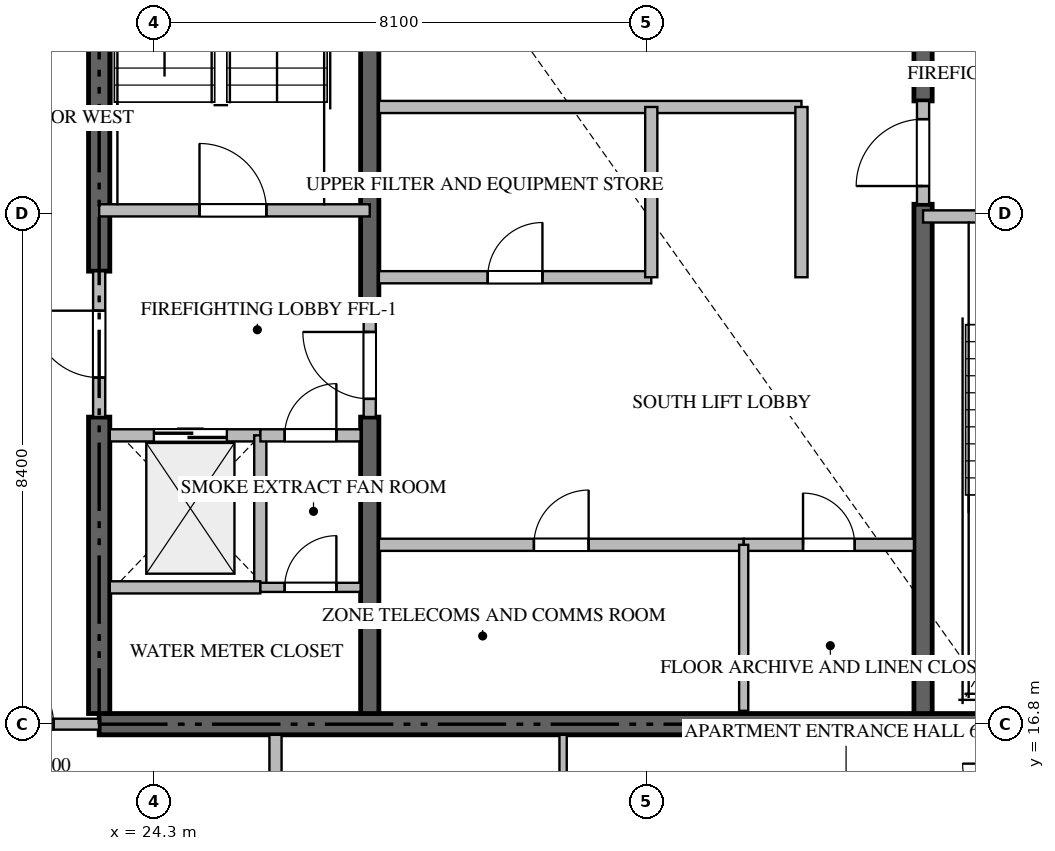
"""IFC4 building model, lengths in metres.
Left out: names, types, materials, properties, quantities, classifications, styles, units other than length and angle.
Written with IfcOpenShell. Run it as: python <this file> out.ifc"""

import sys

from ifc_helpers import new_model, si_unit, direction, frame, frame_2d, origin, place, context, subcontext, project, spatial, rectangle, extrude, source, transform, mapped, element, fill, save


model = new_model("IFC4")
c1 = context("Model", 3, precision=1e-05, world=origin(), true_north=direction((0.0, 1.0)))
c2 = subcontext(c1, "Body", "Model", "MODEL_VIEW")
j1 = project(units=[si_unit("LENGTHUNIT", "METRE"), si_unit("PLANEANGLEUNIT", "RADIAN")], contexts=[c1])
p1 = place(None, origin())
s1 = spatial("IfcSite", under=j1, at=p1, CompositionType="ELEMENT")
p2 = place(p1, origin())
s2 = spatial("IfcBuilding", under=s1, at=p2, CompositionType="ELEMENT")
p3 = place(p2, frame((0.0, 0.0, 252.8)))
s3 = spatial("IfcBuildingStorey", under=s2, at=p3, CompositionType="ELEMENT", Elevation=252.8)
p4 = place(p3, frame((23.4, 16.8, -0.26), z_axis=(0.0, 0.0, 1.0), x_axis=(1.0, 0.0, 0.0)))
e1 = element("IfcWall", 1, at=p4, inside=s3, PredefinedType="SHEAR", context=c2, shape_type="SweptSolid", body=[
    extrude(rectangle(XDim=18.0, YDim=0.35, at=frame_2d((9.0, 0.0))), origin(), (0.0, 0.0, 1.0), 3.848),
])
p5 = place(p3, frame((23.4, 16.975, -0.26), z_axis=(0.0, 0.0, 1.0), x_axis=(0.0, 1.0, 0.0)))
e2 = element("IfcWall", 2, at=p5, inside=s3, PredefinedType="SHEAR", context=c2, shape_type="SweptSolid", body=[
    extrude(rectangle(XDim=4.875, YDim=0.35, at=frame_2d((2.438, 0.0))), origin(), (0.0, 0.0, 1.0), 3.848),
])
p6 = place(p3, frame((23.4, 24.25, -0.26), z_axis=(0.0, 0.0, 1.0), x_axis=(0.0, 1.0, 0.0)))
e3 = element("IfcWall", 3, at=p6, inside=s3, PredefinedType="SHEAR", context=c2, shape_type="SweptSolid", body=[
    extrude(rectangle(XDim=9.175, YDim=0.35, at=frame_2d((4.587, 0.0))), origin(), (0.0, 0.0, 1.0), 3.848),
])
p7 = place(p3, frame((27.85, 16.975, -0.26), z_axis=(0.0, 0.0, 1.0), x_axis=(0.0, 1.0, 0.0)))
e4 = element("IfcWall", 4, at=p7, inside=s3, PredefinedType="SHEAR", context=c2, shape_type="SweptSolid", body=[
    extrude(rectangle(XDim=4.875, YDim=0.3, at=frame_2d((2.438, 0.0))), origin(), (0.0, 0.0, 1.0), 3.848),
])
p8 = place(p3, frame((27.85, 23.55, -0.26), z_axis=(0.0, 0.0, 1.0), x_axis=(0.0, 1.0, 0.0)))
e5 = element("IfcWall", 5, at=p8, inside=s3, PredefinedType="SHEAR", context=c2, shape_type="SweptSolid", body=[
    extrude(rectangle(XDim=9.875, YDim=0.3, at=frame_2d((4.938, 0.0))), origin(), (0.0, 0.0, 1.0), 3.848),
])
p9 = place(p3, frame((36.95, 16.975, -0.26), z_axis=(0.0, 0.0, 1.0), x_axis=(0.0, 1.0, 0.0)))
e6 = element("IfcWall", 6, at=p9, inside=s3, PredefinedType="SHEAR", context=c2, shape_type="SweptSolid", body=[
    extrude(rectangle(XDim=8.375, YDim=0.3, at=frame_2d((4.188, 0.0))), origin(), (0.0, 0.0, 1.0), 3.848),
])
p10 = place(p3, frame((36.95, 27.05, -0.26), z_axis=(0.0, 0.0, 1.0), x_axis=(0.0, 1.0, 0.0)))
e7 = element("IfcWall", 7, at=p10, inside=s3, PredefinedType="SHEAR", context=c2, shape_type="SweptSolid", body=[
    extrude(rectangle(XDim=6.375, YDim=0.3, at=frame_2d((3.188, 0.0))), origin(), (0.0, 0.0, 1.0), 3.848),
])
p11 = place(p3, frame((23.4, 25.25, 0.0), z_axis=(0.0, 0.0, 1.0), x_axis=(1.0, 0.0, 0.0)))
e8 = element("IfcWall", 8, at=p11, inside=s3, PredefinedType="STANDARD", context=c2, shape_type="SweptSolid", body=[
    extrude(rectangle(XDim=4.45, YDim=0.2, at=frame_2d((2.225, 0.0))), origin(), (0.0, 0.0, 1.0), 3.59),
])
p12 = place(p11, frame((1.65, 0.0, 0.0)))
e9 = element("IfcOpeningElement", 9, at=p12, cuts=e8, PredefinedType="OPENING", context=c2, shape_type="SweptSolid", body=[
    extrude(rectangle(XDim=1.1, YDim=2.15, at=frame_2d((0.55, 1.075))), frame((0.0, 0.11, 0.0), z_axis=(0.0, -1.0, 0.0), x_axis=(1.0, 0.0, 0.0)), (0.0, 0.0, 1.0), 0.22),
])
p13 = place(p3, frame((36.95, 25.15, 0.0), z_axis=(0.0, 0.0, 1.0), x_axis=(1.0, 0.0, 0.0)))
e10 = element("IfcWall", 10, at=p13, inside=s3, PredefinedType="STANDARD", context=c2, shape_type="SweptSolid", body=[
    extrude(rectangle(XDim=4.45, YDim=0.2, at=frame_2d((2.225, 0.0))), origin(), (0.0, 0.0, 1.0), 3.59),
])
p14 = place(p13, frame((1.65, 0.0, 0.0)))
e11 = element("IfcOpeningElement", 11, at=p14, cuts=e10, PredefinedType="OPENING", context=c2, shape_type="SweptSolid", body=[
    extrude(rectangle(XDim=1.1, YDim=2.15, at=frame_2d((0.55, 1.075))), frame((0.0, 0.11, 0.0), z_axis=(0.0, -1.0, 0.0), x_axis=(1.0, 0.0, 0.0)), (0.0, 0.0, 1.0), 0.22),
])
p15 = place(p3, frame((23.575, 21.55, 0.0), z_axis=(0.0, 0.0, 1.0), x_axis=(1.0, 0.0, 0.0)))
e12 = element("IfcWall", 12, at=p15, inside=s3, PredefinedType="STANDARD", context=c2, shape_type="SweptSolid", body=[
    extrude(rectangle(XDim=2.475, YDim=0.2, at=frame_2d((1.238, 0.0))), origin(), (0.0, 0.0, 1.0), 3.59),
])
p16 = place(p15, frame((0.725, 0.0, 0.0)))
e13 = element("IfcOpeningElement", 13, at=p16, cuts=e12, PredefinedType="OPENING", context=c2, shape_type="SweptSolid", body=[
    extrude(rectangle(XDim=1.2, YDim=2.2, at=frame_2d((0.6, 1.1))), frame((0.0, 0.11, 0.0), z_axis=(0.0, -1.0, 0.0), x_axis=(1.0, 0.0, 0.0)), (0.0, 0.0, 1.0), 0.22),
])
p17 = place(p3, frame((26.05, 19.05, 0.0), z_axis=(0.0, 0.0, 1.0), x_axis=(0.0, 1.0, 0.0)))
e14 = element("IfcWall", 14, at=p17, inside=s3, PredefinedType="STANDARD", context=c2, shape_type="SweptSolid", body=[
    extrude(rectangle(XDim=2.5, YDim=0.2, at=frame_2d((1.25, 0.0))), origin(), (0.0, 0.0, 1.0), 3.59),
])
p18 = place(p3, frame((23.575, 19.05, 0.0), z_axis=(0.0, 0.0, 1.0), x_axis=(1.0, 0.0, 0.0)))
e15 = element("IfcWall", 15, at=p18, inside=s3, PredefinedType="STANDARD", context=c2, shape_type="SweptSolid", body=[
    extrude(rectangle(XDim=2.475, YDim=0.2, at=frame_2d((1.238, 0.0))), origin(), (0.0, 0.0, 1.0), 3.59),
])
p19 = place(p3, frame((26.052, 21.55, 0.0), z_axis=(0.0, 0.0, 1.0), x_axis=(1.0, 0.0, 0.0)))
e16 = element("IfcWall", 16, at=p19, inside=s3, PredefinedType="STANDARD", context=c2, shape_type="SweptSolid", body=[
    extrude(rectangle(XDim=1.648, YDim=0.2, at=frame_2d((0.824, 0.0))), origin(), (0.0, 0.0, 1.0), 3.59),
])
p20 = place(p19, frame((0.399, 0.0, 0.0)))
e17 = element("IfcOpeningElement", 17, at=p20, cuts=e16, PredefinedType="OPENING", context=c2, shape_type="SweptSolid", body=[
    extrude(rectangle(XDim=0.85, YDim=2.1, at=frame_2d((0.425, 1.05))), frame((0.0, 0.11, 0.0), z_axis=(0.0, -1.0, 0.0), x_axis=(1.0, 0.0, 0.0)), (0.0, 0.0, 1.0), 0.22),
])
p21 = place(p3, frame((23.4, 21.852, 0.0), z_axis=(0.0, 0.0, 1.0), x_axis=(0.0, 1.0, 0.0)))
e18 = element("IfcWall", 18, at=p21, inside=s3, PredefinedType="STANDARD", context=c2, shape_type="SweptSolid", body=[
    extrude(rectangle(XDim=2.396, YDim=0.2, at=frame_2d((1.198, 0.0))), origin(), (0.0, 0.0, 1.0), 3.59),
])
p22 = place(p21, frame((0.648, 0.0, 0.0)))
e19 = element("IfcOpeningElement", 19, at=p22, cuts=e18, PredefinedType="OPENING", context=c2, shape_type="SweptSolid", body=[
    extrude(rectangle(XDim=1.1, YDim=2.15, at=frame_2d((0.55, 1.075))), frame((0.0, 0.11, 0.0), z_axis=(0.0, -1.0, 0.0), x_axis=(1.0, 0.0, 0.0)), (0.0, 0.0, 1.0), 0.22),
])
p23 = place(p3, frame((27.85, 21.852, 0.0), z_axis=(0.0, 0.0, 1.0), x_axis=(0.0, 1.0, 0.0)))
e20 = element("IfcWall", 20, at=p23, inside=s3, PredefinedType="STANDARD", context=c2, shape_type="SweptSolid", body=[
    extrude(rectangle(XDim=1.696, YDim=0.2, at=frame_2d((0.848, 0.0))), origin(), (0.0, 0.0, 1.0), 3.59),
])
p24 = place(p23, frame((0.298, 0.0, 0.0)))
e21 = element("IfcOpeningElement", 21, at=p24, cuts=e20, PredefinedType="OPENING", context=c2, shape_type="SweptSolid", body=[
    extrude(rectangle(XDim=1.1, YDim=2.15, at=frame_2d((0.55, 1.075))), frame((0.0, 0.11, 0.0), z_axis=(0.0, -1.0, 0.0), x_axis=(1.0, 0.0, 0.0)), (0.0, 0.0, 1.0), 0.22),
])
p25 = place(p3, frame((36.95, 25.352, 0.0), z_axis=(0.0, 0.0, 1.0), x_axis=(0.0, 1.0, 0.0)))
e22 = element("IfcWall", 22, at=p25, inside=s3, PredefinedType="STANDARD", context=c2, shape_type="SweptSolid", body=[
    extrude(rectangle(XDim=1.696, YDim=0.2, at=frame_2d((0.848, 0.0))), origin(), (0.0, 0.0, 1.0), 3.59),
])
p26 = place(p25, frame((0.298, 0.0, 0.0)))
e23 = element("IfcOpeningElement", 23, at=p26, cuts=e22, PredefinedType="OPENING", context=c2, shape_type="SweptSolid", body=[
    extrude(rectangle(XDim=1.1, YDim=2.15, at=frame_2d((0.55, 1.075))), frame((0.0, 0.11, 0.0), z_axis=(0.0, -1.0, 0.0), x_axis=(1.0, 0.0, 0.0)), (0.0, 0.0, 1.0), 0.22),
])
p27 = place(p3, frame((26.052, 19.05, 0.0), z_axis=(0.0, 0.0, 1.0), x_axis=(1.0, 0.0, 0.0)))
e24 = element("IfcWall", 24, at=p27, inside=s3, PredefinedType="PARTITIONING", context=c2, shape_type="SweptSolid", body=[
    extrude(rectangle(XDim=1.648, YDim=0.15, at=frame_2d((0.824, 0.0))), origin(), (0.0, 0.0, 1.0), 3.59),
])
p28 = place(p27, frame((0.399, 0.0, 0.0)))
e25 = element("IfcOpeningElement", 25, at=p28, cuts=e24, PredefinedType="OPENING", context=c2, shape_type="SweptSolid", body=[
    extrude(rectangle(XDim=0.85, YDim=2.1, at=frame_2d((0.425, 1.05))), frame((0.0, 0.085, 0.0), z_axis=(0.0, -1.0, 0.0), x_axis=(1.0, 0.0, 0.0)), (0.0, 0.0, 1.0), 0.17),
])
p29 = place(p3, frame((28.0, 19.75, 0.0), z_axis=(0.0, 0.0, 1.0), x_axis=(1.0, 0.0, 0.0)))
e26 = element("IfcWall", 26, at=p29, inside=s3, PredefinedType="STANDARD", context=c2, shape_type="SweptSolid", body=[
    extrude(rectangle(XDim=6.0, YDim=0.2, at=frame_2d((3.0, 0.0))), origin(), (0.0, 0.0, 1.0), 3.59),
])
p30 = place(p29, frame((2.55, 0.0, 0.0)))
e27 = element("IfcOpeningElement", 27, at=p30, cuts=e26, PredefinedType="OPENING", context=c2, shape_type="SweptSolid", body=[
    extrude(rectangle(XDim=0.9, YDim=2.1, at=frame_2d((0.45, 1.05))), frame((0.0, 0.11, 0.0), z_axis=(0.0, -1.0, 0.0), x_axis=(1.0, 0.0, 0.0)), (0.0, 0.0, 1.0), 0.22),
])
p31 = place(p3, frame((34.002, 19.75, 0.0), z_axis=(0.0, 0.0, 1.0), x_axis=(1.0, 0.0, 0.0)))
e28 = element("IfcWall", 28, at=p31, inside=s3, PredefinedType="STANDARD", context=c2, shape_type="SweptSolid", body=[
    extrude(rectangle(XDim=2.798, YDim=0.2, at=frame_2d((1.399, 0.0))), origin(), (0.0, 0.0, 1.0), 3.59),
])
p32 = place(p31, frame((0.974, 0.0, 0.0)))
e29 = element("IfcOpeningElement", 29, at=p32, cuts=e28, PredefinedType="OPENING", context=c2, shape_type="SweptSolid", body=[
    extrude(rectangle(XDim=0.85, YDim=2.1, at=frame_2d((0.425, 1.05))), frame((0.0, 0.11, 0.0), z_axis=(0.0, -1.0, 0.0), x_axis=(1.0, 0.0, 0.0)), (0.0, 0.0, 1.0), 0.22),
])
p33 = place(p3, frame((34.0, 17.02, 0.0), z_axis=(0.0, 0.0, 1.0), x_axis=(0.0, 1.0, 0.0)))
e30 = element("IfcWall", 30, at=p33, inside=s3, PredefinedType="PARTITIONING", context=c2, shape_type="SweptSolid", body=[
    extrude(rectangle(XDim=2.73, YDim=0.15, at=frame_2d((1.365, 0.0))), origin(), (0.0, 0.0, 1.0), 3.59),
])
p34 = place(p3, frame((28.0, 26.95, 0.0), z_axis=(0.0, 0.0, 1.0), x_axis=(1.0, 0.0, 0.0)))
e31 = element("IfcWall", 31, at=p34, inside=s3, PredefinedType="STANDARD", context=c2, shape_type="SweptSolid", body=[
    extrude(rectangle(XDim=6.95, YDim=0.2, at=frame_2d((3.475, 0.0))), origin(), (0.0, 0.0, 1.0), 3.59),
])
p35 = place(p3, frame((34.95, 24.15, 0.0), z_axis=(0.0, 0.0, 1.0), x_axis=(0.0, 1.0, 0.0)))
e32 = element("IfcWall", 32, at=p35, inside=s3, PredefinedType="STANDARD", context=c2, shape_type="SweptSolid", body=[
    extrude(rectangle(XDim=2.8, YDim=0.2, at=frame_2d((1.4, 0.0))), origin(), (0.0, 0.0, 1.0), 3.59),
])
p36 = place(p3, frame((28.0, 24.15, 0.0), z_axis=(0.0, 0.0, 1.0), x_axis=(1.0, 0.0, 0.0)))
e33 = element("IfcWall", 33, at=p36, inside=s3, PredefinedType="STANDARD", context=c2, shape_type="SweptSolid", body=[
    extrude(rectangle(XDim=4.48, YDim=0.2, at=frame_2d((2.24, 0.0))), origin(), (0.0, 0.0, 1.0), 3.59),
])
p37 = place(p36, frame((1.79, 0.0, 0.0)))
e34 = element("IfcOpeningElement", 34, at=p37, cuts=e33, PredefinedType="OPENING", context=c2, shape_type="SweptSolid", body=[
    extrude(rectangle(XDim=0.9, YDim=2.1, at=frame_2d((0.45, 1.05))), frame((0.0, 0.11, 0.0), z_axis=(0.0, -1.0, 0.0), x_axis=(1.0, 0.0, 0.0)), (0.0, 0.0, 1.0), 0.22),
])
p38 = place(p3, frame((32.48, 24.15, 0.0), z_axis=(0.0, 0.0, 1.0), x_axis=(0.0, 1.0, 0.0)))
e35 = element("IfcWall", 35, at=p38, inside=s3, PredefinedType="STANDARD", context=c2, shape_type="SweptSolid", body=[
    extrude(rectangle(XDim=2.8, YDim=0.2, at=frame_2d((1.4, 0.0))), origin(), (0.0, 0.0, 1.0), 3.59),
])
p39 = place(p3, frame((26.3, 1.282, 0.0), z_axis=(0.0, 0.0, 1.0), x_axis=(0.0, 1.0, 0.0)))
e36 = element("IfcWall", 36, at=p39, inside=s3, PredefinedType="PARTITIONING", context=c2, shape_type="SweptSolid", body=[
    extrude(rectangle(XDim=15.343, YDim=0.2, at=frame_2d((7.671, 0.0))), origin(), (0.0, 0.0, 1.0), 3.59),
])
p40 = place(p3, frame((20.902, 16.8, 0.0), z_axis=(0.0, 0.0, 1.0), x_axis=(1.0, 0.0, 0.0)))
e37 = element("IfcWall", 37, at=p40, inside=s3, PredefinedType="PARTITIONING", context=c2, shape_type="SweptSolid", body=[
    extrude(rectangle(XDim=2.496, YDim=0.18, at=frame_2d((1.248, 0.0))), origin(), (0.0, 0.0, 1.0), 3.59),
])
p41 = place(p40, frame((0.748, 0.0, 0.0)))
e38 = element("IfcOpeningElement", 38, at=p41, cuts=e37, PredefinedType="OPENING", context=c2, shape_type="SweptSolid", body=[
    extrude(rectangle(XDim=1.0, YDim=2.15, at=frame_2d((0.5, 1.075))), frame((0.0, 0.1, 0.0), z_axis=(0.0, -1.0, 0.0), x_axis=(1.0, 0.0, 0.0)), (0.0, 0.0, 1.0), 0.2),
])
p42 = place(p3, frame((31.03, 14.652, 0.0), z_axis=(0.0, 0.0, 1.0), x_axis=(0.0, 1.0, 0.0)))
e39 = element("IfcWall", 39, at=p42, inside=s3, PredefinedType="PARTITIONING", context=c2, shape_type="SweptSolid", body=[
    extrude(rectangle(XDim=1.973, YDim=0.12, at=frame_2d((0.986, 0.0))), origin(), (0.0, 0.0, 1.0), 3.59),
])
m1 = source(origin(), c2, "Body", "SweptSolid", [
    extrude(rectangle(XDim=1.1, YDim=2.15, at=frame_2d((0.55, 1.075))), frame((0.0, 0.025, 0.0), z_axis=(0.0, -1.0, 0.0), x_axis=(1.0, 0.0, 0.0)), (0.0, 0.0, 1.0), 0.05),
])
p43 = place(p12, origin())
e40 = element("IfcDoor", 40, at=p43, inside=s3, OperationType="SINGLE_SWING_LEFT", PredefinedType="DOOR", context=c2, shape_type="MappedRepresentation", body=[
    mapped(m1, transform((0.0, 0.0, 0.0), scale=1.0)),
])
fill(e9, e40)
m2 = source(origin(), c2, "Body", "SweptSolid", [
    extrude(rectangle(XDim=1.2, YDim=2.2, at=frame_2d((0.6, 1.1))), frame((0.0, 0.025, 0.0), z_axis=(0.0, -1.0, 0.0), x_axis=(1.0, 0.0, 0.0)), (0.0, 0.0, 1.0), 0.05),
])
p44 = place(p16, origin())
e41 = element("IfcDoor", 41, at=p44, inside=s3, OperationType="DOUBLE_DOOR_SLIDING", PredefinedType="DOOR", context=c2, shape_type="MappedRepresentation", body=[
    mapped(m2, transform((0.0, 0.0, 0.0), scale=1.0)),
])
fill(e13, e41)
m3 = source(origin(), c2, "Body", "SweptSolid", [
    extrude(rectangle(XDim=0.85, YDim=2.1, at=frame_2d((0.425, 1.05))), frame((0.0, 0.025, 0.0), z_axis=(0.0, -1.0, 0.0), x_axis=(1.0, 0.0, 0.0)), (0.0, 0.0, 1.0), 0.05),
])
p45 = place(p20, origin())
e42 = element("IfcDoor", 42, at=p45, inside=s3, OperationType="SINGLE_SWING_RIGHT", PredefinedType="DOOR", context=c2, shape_type="MappedRepresentation", body=[
    mapped(m3, transform((0.0, 0.0, 0.0), scale=1.0)),
])
fill(e17, e42)
p46 = place(p22, origin())
e43 = element("IfcDoor", 43, at=p46, inside=s3, OperationType="SINGLE_SWING_RIGHT", PredefinedType="DOOR", context=c2, shape_type="MappedRepresentation", body=[
    mapped(m1, transform((0.0, 0.0, 0.0), scale=1.0)),
])
fill(e19, e43)
p47 = place(p24, origin())
e44 = element("IfcDoor", 44, at=p47, inside=s3, OperationType="SINGLE_SWING_RIGHT", PredefinedType="DOOR", context=c2, shape_type="MappedRepresentation", body=[
    mapped(m1, transform((0.0, 0.0, 0.0), scale=1.0)),
])
fill(e21, e44)
p48 = place(p26, origin())
e45 = element("IfcDoor", 45, at=p48, inside=s3, OperationType="SINGLE_SWING_LEFT", PredefinedType="DOOR", context=c2, shape_type="MappedRepresentation", body=[
    mapped(m1, transform((0.0, 0.0, 0.0), scale=1.0)),
])
fill(e23, e45)
p49 = place(p28, origin())
e46 = element("IfcDoor", 46, at=p49, inside=s3, OperationType="SINGLE_SWING_RIGHT", PredefinedType="DOOR", context=c2, shape_type="MappedRepresentation", body=[
    mapped(m3, transform((0.0, 0.0, 0.0), scale=1.0)),
])
fill(e25, e46)
m4 = source(origin(), c2, "Body", "SweptSolid", [
    extrude(rectangle(XDim=0.9, YDim=2.1, at=frame_2d((0.45, 1.05))), frame((0.0, 0.025, 0.0), z_axis=(0.0, -1.0, 0.0), x_axis=(1.0, 0.0, 0.0)), (0.0, 0.0, 1.0), 0.05),
])
p50 = place(p30, origin())
e47 = element("IfcDoor", 47, at=p50, inside=s3, OperationType="SINGLE_SWING_RIGHT", PredefinedType="DOOR", context=c2, shape_type="MappedRepresentation", body=[
    mapped(m4, transform((0.0, 0.0, 0.0), scale=1.0)),
])
fill(e27, e47)
p51 = place(p32, origin())
e48 = element("IfcDoor", 48, at=p51, inside=s3, OperationType="SINGLE_SWING_LEFT", PredefinedType="DOOR", context=c2, shape_type="MappedRepresentation", body=[
    mapped(m3, transform((0.0, 0.0, 0.0), scale=1.0)),
])
fill(e29, e48)
p52 = place(p37, origin())
e49 = element("IfcDoor", 49, at=p52, inside=s3, OperationType="SINGLE_SWING_RIGHT", PredefinedType="DOOR", context=c2, shape_type="MappedRepresentation", body=[
    mapped(m4, transform((0.0, 0.0, 0.0), scale=1.0)),
])
fill(e34, e49)
m5 = source(origin(), c2, "Body", "SweptSolid", [
    extrude(rectangle(XDim=1.0, YDim=2.15, at=frame_2d((0.5, 1.075))), frame((0.0, 0.025, 0.0), z_axis=(0.0, -1.0, 0.0), x_axis=(1.0, 0.0, 0.0)), (0.0, 0.0, 1.0), 0.05),
])
p53 = place(p41, origin())
e50 = element("IfcDoor", 50, at=p53, inside=s3, OperationType="SINGLE_SWING_LEFT", PredefinedType="DOOR", context=c2, shape_type="MappedRepresentation", body=[
    mapped(m5, transform((0.0, 0.0, 0.0), scale=1.0)),
])
fill(e38, e50)
save(model, sys.argv[1])
